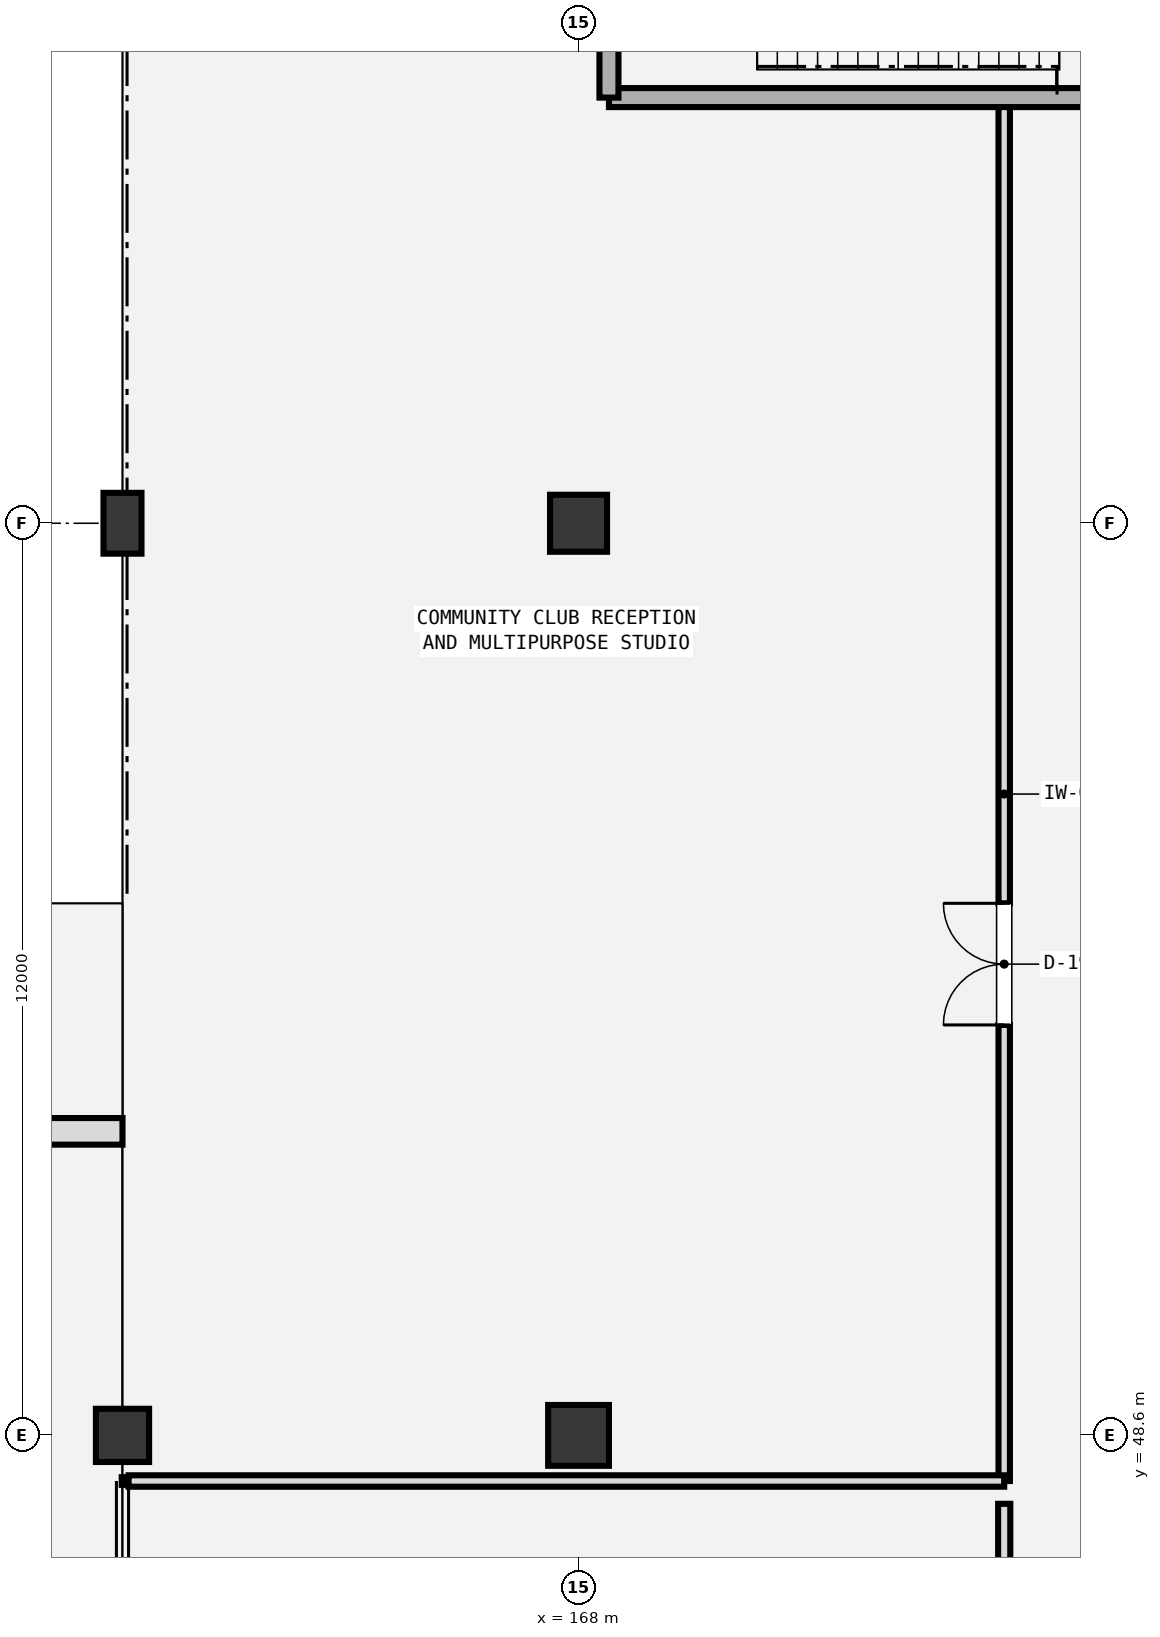
"""IFC4 building model, lengths in metres.
Left out: names, types, materials, properties, quantities, classifications, styles, units other than length and angle.
Written with IfcOpenShell. Run it as: python <this file> out.ifc"""

import sys

from ifc_helpers import new_model, si_unit, direction, frame, frame_2d, origin, origin_2d, place, context, subcontext, project, spatial, rectangle, extrude, element, fill, save


model = new_model("IFC4")
c1 = context("Model", 3, precision=1e-05, world=origin(), true_north=direction((0.0, 1.0)))
c2 = subcontext(c1, "Body", "Model", "MODEL_VIEW")
j1 = project(units=[si_unit("LENGTHUNIT", "METRE"), si_unit("PLANEANGLEUNIT", "RADIAN")], contexts=[c1])
p1 = place(None, origin())
s1 = spatial("IfcSite", under=j1, at=p1, CompositionType="ELEMENT")
p2 = place(p1, origin())
s2 = spatial("IfcBuilding", under=s1, at=p2, CompositionType="ELEMENT")
p3 = place(p2, origin())
s3 = spatial("IfcBuildingStorey", under=s2, at=p3, CompositionType="ELEMENT", Elevation=0.0)
p4 = place(p3, frame((162.0, 48.6, 0.0), z_axis=(0.0, 0.0, 1.0), x_axis=(1.0, 0.0, 0.0)))
e1 = element("IfcColumn", 1, at=p4, inside=s3, PredefinedType="COLUMN", context=c2, shape_type="SweptSolid", body=[
    extrude(rectangle(XDim=0.7, YDim=0.7, at=origin_2d()), origin(), (0.0, 0.0, 1.0), 5.4),
])
p5 = place(p3, frame((162.0, 60.6, 0.0), z_axis=(0.0, 0.0, 1.0), x_axis=(1.0, 0.0, 0.0)))
e2 = element("IfcColumn", 2, at=p5, inside=s3, PredefinedType="COLUMN", context=c2, shape_type="SweptSolid", body=[
    extrude(rectangle(XDim=0.5, YDim=0.8, at=origin_2d()), origin(), (0.0, 0.0, 1.0), 5.4),
])
p6 = place(p3, frame((168.0, 48.6, 0.0), z_axis=(0.0, 0.0, 1.0), x_axis=(1.0, 0.0, 0.0)))
e3 = element("IfcColumn", 3, at=p6, inside=s3, PredefinedType="COLUMN", context=c2, shape_type="SweptSolid", body=[
    extrude(rectangle(XDim=0.8, YDim=0.8, at=origin_2d()), origin(), (0.0, 0.0, 1.0), 5.4),
])
p7 = place(p3, frame((168.0, 60.6, 0.0), z_axis=(0.0, 0.0, 1.0), x_axis=(1.0, 0.0, 0.0)))
e4 = element("IfcColumn", 4, at=p7, inside=s3, PredefinedType="COLUMN", context=c2, shape_type="SweptSolid", body=[
    extrude(rectangle(XDim=0.75, YDim=0.75, at=origin_2d()), origin(), (0.0, 0.0, 1.0), 5.4),
])
p8 = place(p3, frame((96.6, 52.6, 0.0), z_axis=(0.0, 0.0, 1.0), x_axis=(1.0, 0.0, 0.0)))
e5 = element("IfcWall", 5, at=p8, inside=s3, PredefinedType="SOLIDWALL", context=c2, shape_type="SweptSolid", body=[
    extrude(rectangle(XDim=65.4, YDim=0.35, at=frame_2d((32.7, 0.0))), origin(), (0.0, 0.0, 1.0), 4.64),
])
p9 = place(p8, frame((18.0, 0.0, 0.0)))
e6 = element("IfcOpeningElement", 6, at=p9, cuts=e5, PredefinedType="OPENING", context=c2, shape_type="SweptSolid", body=[
    extrude(rectangle(XDim=2.0, YDim=2.4, at=frame_2d((1.0, 1.2))), frame((0.0, 0.185, 0.0), z_axis=(0.0, -1.0, 0.0), x_axis=(1.0, 0.0, 0.0)), (0.0, 0.0, 1.0), 0.37),
])
p10 = place(p8, frame((31.0, 0.0, 0.0)))
e7 = element("IfcOpeningElement", 7, at=p10, cuts=e5, PredefinedType="OPENING", context=c2, shape_type="SweptSolid", body=[
    extrude(rectangle(XDim=2.4, YDim=2.5, at=frame_2d((1.2, 1.25))), frame((0.0, 0.185, 0.0), z_axis=(0.0, -1.0, 0.0), x_axis=(1.0, 0.0, 0.0)), (0.0, 0.0, 1.0), 0.37),
])
p11 = place(p8, frame((50.0, 0.0, 0.0)))
e8 = element("IfcOpeningElement", 8, at=p11, cuts=e5, PredefinedType="OPENING", context=c2, shape_type="SweptSolid", body=[
    extrude(rectangle(XDim=1.8, YDim=2.3, at=frame_2d((0.9, 1.15))), frame((0.0, 0.185, 0.0), z_axis=(0.0, -1.0, 0.0), x_axis=(1.0, 0.0, 0.0)), (0.0, 0.0, 1.0), 0.37),
])
p12 = place(p8, frame((4.0, 0.0, 0.9)))
e9 = element("IfcOpeningElement", 9, at=p12, cuts=e5, PredefinedType="OPENING", context=c2, shape_type="SweptSolid", body=[
    extrude(rectangle(XDim=4.5, YDim=1.2, at=frame_2d((2.25, 0.6))), frame((0.0, 0.185, 0.0), z_axis=(0.0, -1.0, 0.0), x_axis=(1.0, 0.0, 0.0)), (0.0, 0.0, 1.0), 0.37),
])
p13 = place(p8, frame((25.0, 0.0, 0.9)))
e10 = element("IfcOpeningElement", 10, at=p13, cuts=e5, PredefinedType="OPENING", context=c2, shape_type="SweptSolid", body=[
    extrude(rectangle(XDim=3.6, YDim=1.2, at=frame_2d((1.8, 0.6))), frame((0.0, 0.185, 0.0), z_axis=(0.0, -1.0, 0.0), x_axis=(1.0, 0.0, 0.0)), (0.0, 0.0, 1.0), 0.37),
])
p14 = place(p8, frame((37.5, 0.0, 0.9)))
e11 = element("IfcOpeningElement", 11, at=p14, cuts=e5, PredefinedType="OPENING", context=c2, shape_type="SweptSolid", body=[
    extrude(rectangle(XDim=3.6, YDim=1.2, at=frame_2d((1.8, 0.6))), frame((0.0, 0.185, 0.0), z_axis=(0.0, -1.0, 0.0), x_axis=(1.0, 0.0, 0.0)), (0.0, 0.0, 1.0), 0.37),
])
p15 = place(p8, frame((55.6, 0.0, 0.9)))
e12 = element("IfcOpeningElement", 12, at=p15, cuts=e5, PredefinedType="OPENING", context=c2, shape_type="SweptSolid", body=[
    extrude(rectangle(XDim=3.2, YDim=1.2, at=frame_2d((1.6, 0.6))), frame((0.0, 0.185, 0.0), z_axis=(0.0, -1.0, 0.0), x_axis=(1.0, 0.0, 0.0)), (0.0, 0.0, 1.0), 0.37),
])
p16 = place(p3, frame((168.4, 66.2, 0.0), z_axis=(0.0, 0.0, 1.0), x_axis=(1.0, 0.0, 0.0)))
e13 = element("IfcWall", 13, at=p16, inside=s3, PredefinedType="SHEAR", context=c2, shape_type="SweptSolid", body=[
    extrude(rectangle(XDim=10.8, YDim=0.25, at=frame_2d((5.4, 0.0))), origin(), (0.0, 0.0, 1.0), 5.08),
])
p17 = place(p3, frame((168.4, 66.2, 0.0), z_axis=(0.0, 0.0, 1.0), x_axis=(0.0, 1.0, 0.0)))
e14 = element("IfcWall", 14, at=p17, inside=s3, PredefinedType="SHEAR", context=c2, shape_type="SweptSolid", body=[
    extrude(rectangle(XDim=8.6, YDim=0.25, at=frame_2d((4.3, 0.0))), origin(), (0.0, 0.0, 1.0), 5.08),
])
p18 = place(p3, frame((173.6, 48.0, 0.0), z_axis=(0.0, 0.0, 1.0), x_axis=(0.0, 1.0, 0.0)))
e15 = element("IfcWall", 15, at=p18, inside=s3, PredefinedType="PARTITIONING", context=c2, shape_type="SweptSolid", body=[
    extrude(rectangle(XDim=18.075, YDim=0.15, at=frame_2d((9.038, 0.0))), origin(), (0.0, 0.0, 1.0), 3.9),
])
p19 = place(p18, frame((6.0, 0.0, 0.0)))
e16 = element("IfcOpeningElement", 16, at=p19, cuts=e15, PredefinedType="OPENING", context=c2, shape_type="SweptSolid", body=[
    extrude(rectangle(XDim=1.6, YDim=2.2, at=frame_2d((0.8, 1.1))), frame((0.0, 0.085, 0.0), z_axis=(0.0, -1.0, 0.0), x_axis=(1.0, 0.0, 0.0)), (0.0, 0.0, 1.0), 0.17),
])
p20 = place(p3, frame((162.08, 48.0, 0.0), z_axis=(0.0, 0.0, 1.0), x_axis=(1.0, 0.0, 0.0)))
e17 = element("IfcWall", 17, at=p20, inside=s3, PredefinedType="PARTITIONING", context=c2, shape_type="SweptSolid", body=[
    extrude(rectangle(XDim=11.52, YDim=0.15, at=frame_2d((5.76, 0.0))), origin(), (0.0, 0.0, 1.0), 3.9),
])
p21 = place(p3, frame((173.6, 44.4, 0.0), z_axis=(0.0, 0.0, 1.0), x_axis=(0.0, 1.0, 0.0)))
e18 = element("IfcWall", 18, at=p21, inside=s3, PredefinedType="PLUMBINGWALL", context=c2, shape_type="SweptSolid", body=[
    extrude(rectangle(XDim=3.3, YDim=0.16, at=frame_2d((1.65, 0.0))), origin(), (0.0, 0.0, 1.0), 3.9),
])
p22 = place(p21, frame((1.1, 0.0, 0.0)))
e19 = element("IfcOpeningElement", 19, at=p22, cuts=e18, PredefinedType="OPENING", context=c2, shape_type="SweptSolid", body=[
    extrude(rectangle(XDim=0.95, YDim=2.15, at=frame_2d((0.475, 1.075))), frame((0.0, 0.09, 0.0), z_axis=(0.0, -1.0, 0.0), x_axis=(1.0, 0.0, 0.0)), (0.0, 0.0, 1.0), 0.18),
])
p23 = place(p19, origin())
e20 = element("IfcDoor", 20, at=p23, inside=s3, OperationType="DOUBLE_DOOR_SINGLE_SWING", PredefinedType="DOOR", context=c2, shape_type="SweptSolid", body=[
    extrude(rectangle(XDim=1.6, YDim=2.2, at=frame_2d((0.8, 1.1))), frame((0.0, 0.025, 0.0), z_axis=(0.0, -1.0, 0.0), x_axis=(1.0, 0.0, 0.0)), (0.0, 0.0, 1.0), 0.05),
])
fill(e16, e20)
save(model, sys.argv[1])
